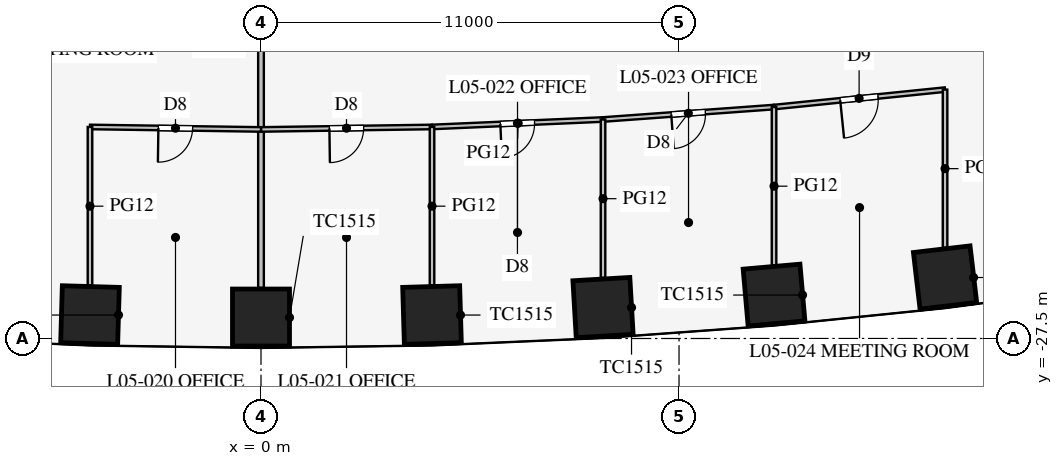
"""IFC4 building model, lengths in metres.
Left out: names, types, materials, properties, quantities, classifications, styles, units other than length and angle.
Written with IfcOpenShell. Run it as: python <this file> out.ifc"""

import sys

from ifc_helpers import new_model, si_unit, direction, frame, frame_2d, origin, origin_2d, place, context, subcontext, project, spatial, rectangle, extrude, element, fill, save


model = new_model("IFC4")
c1 = context("Model", 3, precision=1e-05, world=origin(), true_north=direction((0.0, 1.0)))
c2 = subcontext(c1, "Body", "Model", "MODEL_VIEW")
j1 = project(units=[si_unit("LENGTHUNIT", "METRE"), si_unit("PLANEANGLEUNIT", "RADIAN")], contexts=[c1])
p1 = place(None, origin())
s1 = spatial("IfcSite", under=j1, at=p1, CompositionType="ELEMENT")
p2 = place(p1, origin())
s2 = spatial("IfcBuilding", under=s1, at=p2, CompositionType="ELEMENT")
p3 = place(p2, frame((0.0, 0.0, 24.9)))
s3 = spatial("IfcBuildingStorey", under=s2, at=p3, CompositionType="ELEMENT", Elevation=24.9)
for number, where, z_axis, x_axis in (
    (1, (-4.5, -26.883, 0.0), (0.0, 0.0, 1.0), (1.0, -0.029, 0.0)),
    (2, (0.0, -26.949, 0.0), (0.0, 0.0, 1.0), (1.0, 0.0, 0.0)),
    (3, (4.5, -26.883, 0.0), (0.0, 0.0, 1.0), (1.0, 0.029, 0.0)),
    (4, (9.0, -26.686, 0.0), (0.0, 0.0, 1.0), (0.998, 0.058, 0.0)),
    (5, (13.5, -26.357, 0.0), (0.0, 0.0, 1.0), (0.996, 0.087, 0.0)),
    (6, (18.0, -25.895, 0.0), (0.0, 0.0, 1.0), (0.993, 0.116, 0.0)),
):
    element("IfcColumn", number, at=place(p3, frame(where, z_axis=z_axis, x_axis=x_axis)), inside=s3, PredefinedType="COLUMN", context=c2, shape_type="SweptSolid", body=[
        extrude(rectangle(XDim=1.5, YDim=1.5, at=origin_2d()), origin(), (0.0, 0.0, 1.0), 4.2),
    ])
p4 = place(p3, frame((0.0, -13.41, 0.0), z_axis=(0.0, 0.0, 1.0), x_axis=(0.0, -1.0, 0.0)))
e7 = element("IfcWall", 7, at=p4, inside=s3, PredefinedType="PARTITIONING", context=c2, shape_type="SweptSolid", body=[
    extrude(rectangle(XDim=12.759, YDim=0.15, at=frame_2d((6.379, 0.0))), origin(), (0.0, 0.0, 1.0), 3.2),
])
p5 = place(p3, frame((0.0, -21.999, 0.0), z_axis=(0.0, 0.0, 1.0), x_axis=(0.999894311967, 0.014538393859, 0.0)))
e8 = element("IfcWall", 8, at=p5, inside=s3, PredefinedType="PARTITIONING", context=c2, shape_type="SweptSolid", body=[
    extrude(rectangle(XDim=4.5, YDim=0.12, at=frame_2d((2.25, 0.0))), origin(), (0.0, 0.0, 1.0), 2.9),
])
p6 = place(p5, frame((1.8, 0.0, 0.15)))
e9 = element("IfcOpeningElement", 9, at=p6, cuts=e8, PredefinedType="OPENING", context=c2, shape_type="SweptSolid", body=[
    extrude(rectangle(XDim=0.9, YDim=2.1, at=frame_2d((0.45, 1.05))), frame((0.0, 0.07, 0.0), z_axis=(0.0, -1.0, 0.0), x_axis=(1.0, 0.0, 0.0)), (0.0, 0.0, 1.0), 0.14),
])
p7 = place(p3, frame((13.5, -21.41, 0.0), z_axis=(0.0, 0.0, 1.0), x_axis=(0.994833141332, 0.101523499286, 0.0)))
e10 = element("IfcWall", 10, at=p7, inside=s3, PredefinedType="PARTITIONING", context=c2, shape_type="SweptSolid", body=[
    extrude(rectangle(XDim=4.523, YDim=0.12, at=frame_2d((2.262, 0.0))), origin(), (0.0, 0.0, 1.0), 2.9),
])
p8 = place(p7, frame((1.75, 0.0, 0.15)))
e11 = element("IfcOpeningElement", 11, at=p8, cuts=e10, PredefinedType="OPENING", context=c2, shape_type="SweptSolid", body=[
    extrude(rectangle(XDim=1.0, YDim=2.1, at=frame_2d((0.5, 1.05))), frame((0.0, 0.07, 0.0), z_axis=(0.0, -1.0, 0.0), x_axis=(1.0, 0.0, 0.0)), (0.0, 0.0, 1.0), 0.14),
])
p9 = place(p3, frame((4.5, -21.933, 0.0), z_axis=(0.0, 0.0, 1.0), x_axis=(0.999052370647, 0.043524254212, 0.0)))
e12 = element("IfcWall", 12, at=p9, inside=s3, PredefinedType="PARTITIONING", context=c2, shape_type="SweptSolid", body=[
    extrude(rectangle(XDim=4.504, YDim=0.12, at=frame_2d((2.252, 0.0))), origin(), (0.0, 0.0, 1.0), 2.9),
])
p10 = place(p9, frame((1.8, 0.0, 0.15)))
e13 = element("IfcOpeningElement", 13, at=p10, cuts=e12, PredefinedType="OPENING", context=c2, shape_type="SweptSolid", body=[
    extrude(rectangle(XDim=0.9, YDim=2.1, at=frame_2d((0.45, 1.05))), frame((0.0, 0.07, 0.0), z_axis=(0.0, -1.0, 0.0), x_axis=(1.0, 0.0, 0.0)), (0.0, 0.0, 1.0), 0.14),
])
p11 = place(p3, frame((9.0, -21.737, 0.0), z_axis=(0.0, 0.0, 1.0), x_axis=(0.997363894896, 0.072562119306, 0.0)))
e14 = element("IfcWall", 14, at=p11, inside=s3, PredefinedType="PARTITIONING", context=c2, shape_type="SweptSolid", body=[
    extrude(rectangle(XDim=4.512, YDim=0.12, at=frame_2d((2.256, 0.0))), origin(), (0.0, 0.0, 1.0), 2.9),
])
p12 = place(p11, frame((1.8, 0.0, 0.15)))
e15 = element("IfcOpeningElement", 15, at=p12, cuts=e14, PredefinedType="OPENING", context=c2, shape_type="SweptSolid", body=[
    extrude(rectangle(XDim=0.9, YDim=2.1, at=frame_2d((0.45, 1.05))), frame((0.0, 0.07, 0.0), z_axis=(0.0, -1.0, 0.0), x_axis=(1.0, 0.0, 0.0)), (0.0, 0.0, 1.0), 0.14),
])
p13 = place(p3, frame((-4.5, -21.933, 0.0), z_axis=(0.0, 0.0, 1.0), x_axis=(0.999894311967, -0.014538393859, 0.0)))
e16 = element("IfcWall", 16, at=p13, inside=s3, PredefinedType="PARTITIONING", context=c2, shape_type="SweptSolid", body=[
    extrude(rectangle(XDim=4.5, YDim=0.12, at=frame_2d((2.25, 0.0))), origin(), (0.0, 0.0, 1.0), 2.9),
])
p14 = place(p13, frame((1.8, 0.0, 0.15)))
e17 = element("IfcOpeningElement", 17, at=p14, cuts=e16, PredefinedType="OPENING", context=c2, shape_type="SweptSolid", body=[
    extrude(rectangle(XDim=0.9, YDim=2.1, at=frame_2d((0.45, 1.05))), frame((0.0, 0.07, 0.0), z_axis=(0.0, -1.0, 0.0), x_axis=(1.0, 0.0, 0.0)), (0.0, 0.0, 1.0), 0.14),
])
p15 = place(p3, frame((13.5, -21.41, 0.0), z_axis=(0.0, 0.0, 1.0), x_axis=(0.0, -1.0, 0.0)))
e18 = element("IfcWall", 18, at=p15, inside=s3, PredefinedType="PARTITIONING", context=c2, shape_type="SweptSolid", body=[
    extrude(rectangle(XDim=4.164, YDim=0.12, at=frame_2d((2.082, 0.0))), origin(), (0.0, 0.0, 1.0), 2.9),
])
p16 = place(p3, frame((18.0, -20.951, 0.0), z_axis=(0.0, 0.0, 1.0), x_axis=(0.0, -1.0, 0.0)))
e19 = element("IfcWall", 19, at=p16, inside=s3, PredefinedType="PARTITIONING", context=c2, shape_type="SweptSolid", body=[
    extrude(rectangle(XDim=4.159, YDim=0.12, at=frame_2d((2.08, 0.0))), origin(), (0.0, 0.0, 1.0), 2.9),
])
p17 = place(p3, frame((4.5, -21.933, 0.0), z_axis=(0.0, 0.0, 1.0), x_axis=(0.0, -1.0, 0.0)))
e20 = element("IfcWall", 20, at=p17, inside=s3, PredefinedType="PARTITIONING", context=c2, shape_type="SweptSolid", body=[
    extrude(rectangle(XDim=4.169, YDim=0.12, at=frame_2d((2.085, 0.0))), origin(), (0.0, 0.0, 1.0), 2.9),
])
p18 = place(p3, frame((9.0, -21.737, 0.0), z_axis=(0.0, 0.0, 1.0), x_axis=(0.0, -1.0, 0.0)))
e21 = element("IfcWall", 21, at=p18, inside=s3, PredefinedType="PARTITIONING", context=c2, shape_type="SweptSolid", body=[
    extrude(rectangle(XDim=4.167, YDim=0.12, at=frame_2d((2.084, 0.0))), origin(), (0.0, 0.0, 1.0), 2.9),
])
p19 = place(p3, frame((-4.5, -21.933, 0.0), z_axis=(0.0, 0.0, 1.0), x_axis=(0.0, -1.0, 0.0)))
e22 = element("IfcWall", 22, at=p19, inside=s3, PredefinedType="PARTITIONING", context=c2, shape_type="SweptSolid", body=[
    extrude(rectangle(XDim=4.169, YDim=0.12, at=frame_2d((2.085, 0.0))), origin(), (0.0, 0.0, 1.0), 2.9),
])
p20 = place(p14, frame((0.9, 0.0, 0.0), z_axis=(0.0, 0.0, 1.0), x_axis=(-1.0, 0.0, 0.0)))
e23 = element("IfcDoor", 23, at=p20, inside=s3, OperationType="SINGLE_SWING_RIGHT", PredefinedType="DOOR", context=c2, shape_type="SweptSolid", body=[
    extrude(rectangle(XDim=0.9, YDim=2.1, at=frame_2d((0.45, 1.05))), frame((0.0, 0.025, 0.0), z_axis=(0.0, -1.0, 0.0), x_axis=(1.0, 0.0, 0.0)), (0.0, 0.0, 1.0), 0.05),
])
fill(e17, e23)
p21 = place(p6, frame((0.9, 0.0, 0.0), z_axis=(0.0, 0.0, 1.0), x_axis=(-1.0, 0.0, 0.0)))
e24 = element("IfcDoor", 24, at=p21, inside=s3, OperationType="SINGLE_SWING_RIGHT", PredefinedType="DOOR", context=c2, shape_type="SweptSolid", body=[
    extrude(rectangle(XDim=0.9, YDim=2.1, at=frame_2d((0.45, 1.05))), frame((0.0, 0.025, 0.0), z_axis=(0.0, -1.0, 0.0), x_axis=(1.0, 0.0, 0.0)), (0.0, 0.0, 1.0), 0.05),
])
fill(e9, e24)
p22 = place(p10, frame((0.9, 0.0, 0.0), z_axis=(0.0, 0.0, 1.0), x_axis=(-1.0, 0.0, 0.0)))
e25 = element("IfcDoor", 25, at=p22, inside=s3, OperationType="SINGLE_SWING_RIGHT", PredefinedType="DOOR", context=c2, shape_type="SweptSolid", body=[
    extrude(rectangle(XDim=0.9, YDim=2.1, at=frame_2d((0.45, 1.05))), frame((0.0, 0.025, 0.0), z_axis=(0.0, -1.0, 0.0), x_axis=(1.0, 0.0, 0.0)), (0.0, 0.0, 1.0), 0.05),
])
fill(e13, e25)
p23 = place(p12, frame((0.9, 0.0, 0.0), z_axis=(0.0, 0.0, 1.0), x_axis=(-1.0, 0.0, 0.0)))
e26 = element("IfcDoor", 26, at=p23, inside=s3, OperationType="SINGLE_SWING_RIGHT", PredefinedType="DOOR", context=c2, shape_type="SweptSolid", body=[
    extrude(rectangle(XDim=0.9, YDim=2.1, at=frame_2d((0.45, 1.05))), frame((0.0, 0.025, 0.0), z_axis=(0.0, -1.0, 0.0), x_axis=(1.0, 0.0, 0.0)), (0.0, 0.0, 1.0), 0.05),
])
fill(e15, e26)
p24 = place(p8, frame((1.0, 0.0, 0.0), z_axis=(0.0, 0.0, 1.0), x_axis=(-1.0, 0.0, 0.0)))
e27 = element("IfcDoor", 27, at=p24, inside=s3, OperationType="SINGLE_SWING_RIGHT", PredefinedType="DOOR", context=c2, shape_type="SweptSolid", body=[
    extrude(rectangle(XDim=1.0, YDim=2.1, at=frame_2d((0.5, 1.05))), frame((0.0, 0.025, 0.0), z_axis=(0.0, -1.0, 0.0), x_axis=(1.0, 0.0, 0.0)), (0.0, 0.0, 1.0), 0.05),
])
fill(e11, e27)
save(model, sys.argv[1])
